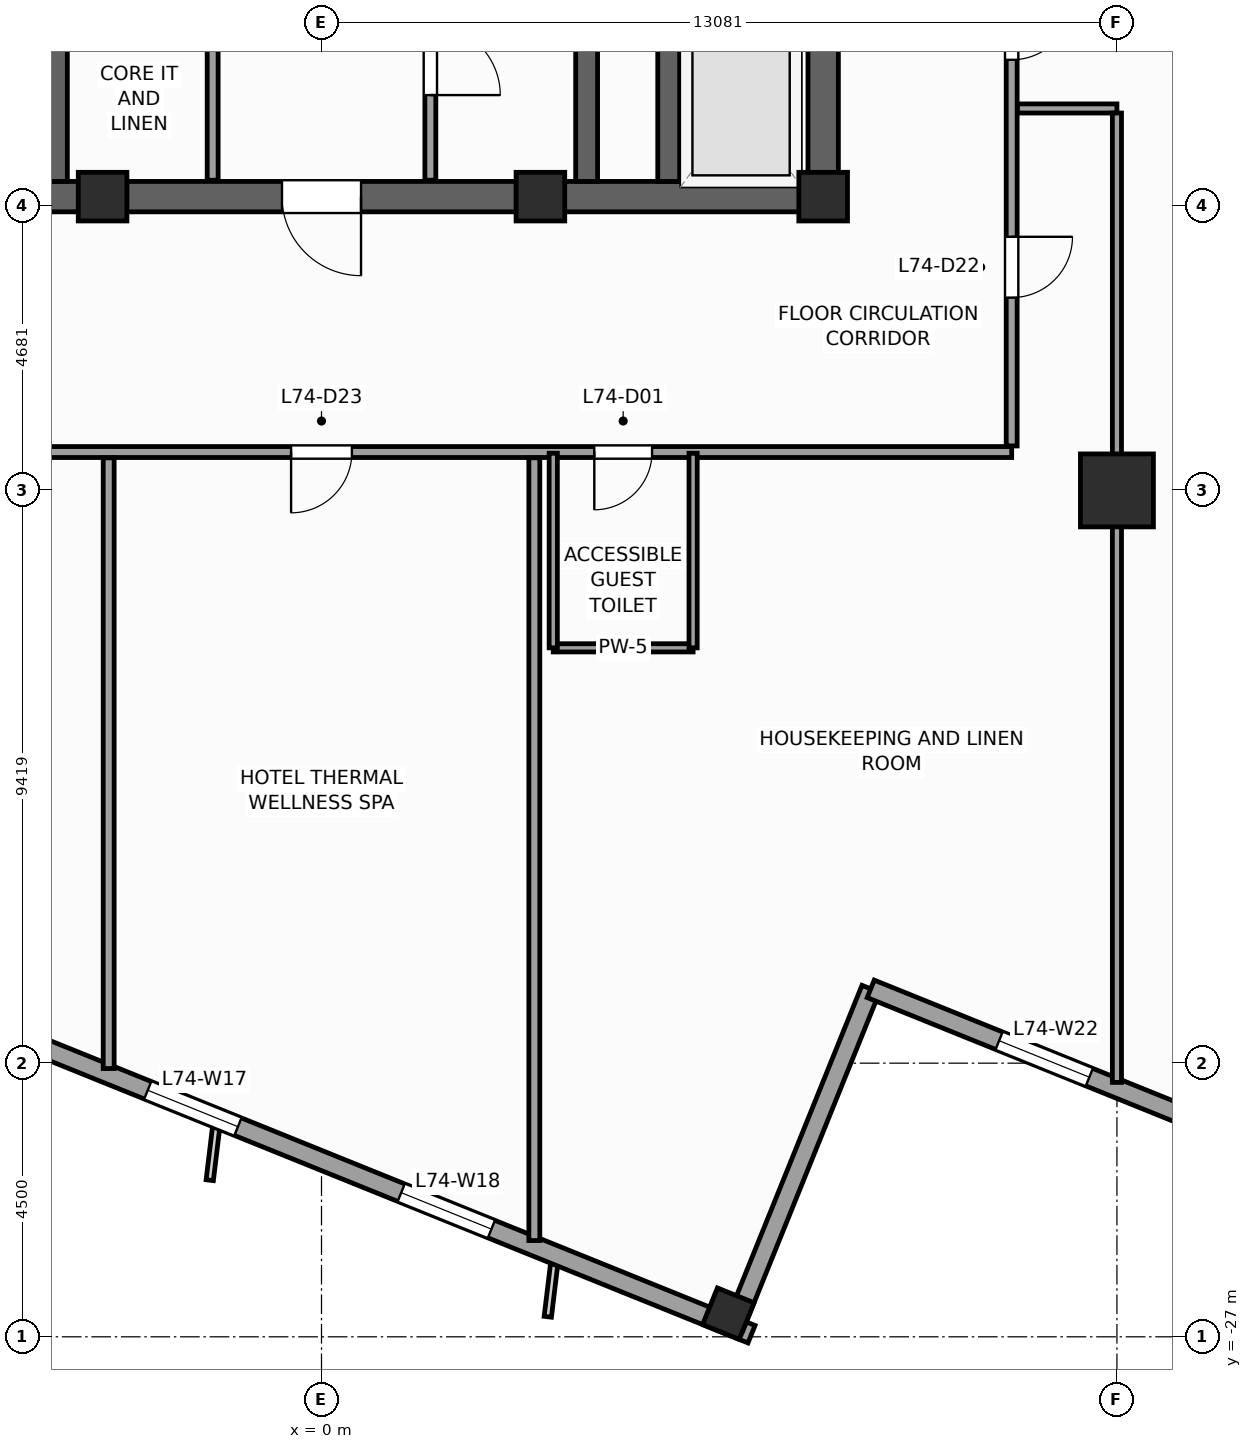
"""IFC4 building model, lengths in metres.
Left out: names, types, materials, properties, quantities, classifications, styles, units other than length and angle.
Written with IfcOpenShell. Run it as: python <this file> out.ifc"""

import sys

from ifc_helpers import new_model, si_unit, direction, frame, frame_2d, origin, origin_2d, place, context, subcontext, project, spatial, rectangle, extrude, source, transform, mapped, element, fill, save


model = new_model("IFC4")
c1 = context("Model", 3, precision=1e-05, world=origin(), true_north=direction((0.0, 1.0)))
c2 = subcontext(c1, "Body", "Model", "MODEL_VIEW")
j1 = project(units=[si_unit("LENGTHUNIT", "METRE"), si_unit("PLANEANGLEUNIT", "RADIAN")], contexts=[c1])
p1 = place(None, origin())
s1 = spatial("IfcSite", under=j1, at=p1, CompositionType="ELEMENT")
p2 = place(p1, origin())
s2 = spatial("IfcBuilding", under=s1, at=p2, CompositionType="ELEMENT")
p3 = place(p2, frame((0.0, 0.0, 301.2)))
s3 = spatial("IfcBuildingStorey", under=s2, at=p3, CompositionType="ELEMENT", Elevation=301.2)
p4 = place(p3, frame((-8.5, -8.25, 0.0), z_axis=(0.0, 0.0, 1.0), x_axis=(1.0, 0.0, 0.0)))
e1 = element("IfcWall", 1, at=p4, inside=s3, PredefinedType="SHEAR", context=c2, shape_type="SweptSolid", body=[
    extrude(rectangle(XDim=17.0, YDim=0.5, at=frame_2d((8.5, 0.0))), origin(), (0.0, 0.0, 1.0), 3.6),
])
p5 = place(p4, frame((7.85, 0.0, 0.0)))
e2 = element("IfcOpeningElement", 2, at=p5, cuts=e1, PredefinedType="OPENING", context=c2, shape_type="SweptSolid", body=[
    extrude(rectangle(XDim=1.3, YDim=2.2, at=frame_2d((0.65, 1.1))), frame((0.0, 0.26, 0.0), z_axis=(0.0, -1.0, 0.0), x_axis=(1.0, 0.0, 0.0)), (0.0, 0.0, 1.0), 0.52),
])
p6 = place(p3, frame((8.25, -8.0, 0.0), z_axis=(0.0, 0.0, 1.0), x_axis=(0.0, 1.0, 0.0)))
e3 = element("IfcWall", 3, at=p6, inside=s3, PredefinedType="SHEAR", context=c2, shape_type="SweptSolid", body=[
    extrude(rectangle(XDim=16.0, YDim=0.5, at=frame_2d((8.0, 0.0))), origin(), (0.0, 0.0, 1.0), 3.6),
])
p7 = place(p6, frame((4.69, 0.0, 0.0)))
e4 = element("IfcOpeningElement", 4, at=p7, cuts=e3, PredefinedType="OPENING", context=c2, shape_type="SweptSolid", body=[
    extrude(rectangle(XDim=1.3, YDim=2.2, at=frame_2d((0.65, 1.1))), frame((0.0, 0.26, 0.0), z_axis=(0.0, -1.0, 0.0), x_axis=(1.0, 0.0, 0.0)), (0.0, 0.0, 1.0), 0.52),
])
for number, where, z_axis, x_axis in (
    (5, (-4.36, -8.0, 0.0), (0.0, 0.0, 1.0), (0.0, 1.0, 0.0)),
    (6, (4.36, -8.0, 0.0), (0.0, 0.0, 1.0), (0.0, 1.0, 0.0)),
):
    element("IfcWall", number, at=place(p3, frame(where, z_axis=z_axis, x_axis=x_axis)), inside=s3, PredefinedType="SHEAR", context=c2, shape_type="SweptSolid", body=[
        extrude(rectangle(XDim=16.0, YDim=0.36, at=frame_2d((8.0, 0.0))), origin(), (0.0, 0.0, 1.0), 3.6),
    ])
p8 = place(p3, frame((5.71, -8.0, 0.0), z_axis=(0.0, 0.0, 1.0), x_axis=(0.0, 1.0, 0.0)))
e7 = element("IfcWall", 7, at=p8, inside=s3, PredefinedType="SHEAR", context=c2, shape_type="SweptSolid", body=[
    extrude(rectangle(XDim=2.54, YDim=0.36, at=frame_2d((1.27, 0.0))), origin(), (0.0, 0.0, 1.0), 3.6),
])
m1 = source(origin(), c2, "Body", "SweptSolid", [
    extrude(rectangle(XDim=0.8, YDim=0.8, at=origin_2d()), origin(), (0.0, 0.0, 1.0), 3.6),
])
for number, where, z_axis, x_axis in (
    (8, (8.25, -8.25, 0.0), (0.0, 0.0, 1.0), (1.0, 0.0, 0.0)),
    (9, (-3.6, -8.25, 0.0), (0.0, 0.0, 1.0), (1.0, 0.0, 0.0)),
    (10, (3.6, -8.25, 0.0), (0.0, 0.0, 1.0), (1.0, 0.0, 0.0)),
):
    element("IfcColumn", number, at=place(p3, frame(where, z_axis=z_axis, x_axis=x_axis)), inside=s3, PredefinedType="PILASTER", context=c2, shape_type="MappedRepresentation", body=[
        mapped(m1, transform((0.0, 0.0, 0.0), scale=1.0)),
    ])
m2 = source(origin(), c2, "Body", "SweptSolid", [
    extrude(rectangle(XDim=1.2, YDim=1.2, at=origin_2d()), origin(), (0.0, 0.0, 1.0), 3.6),
])
p9 = place(p3, frame((13.081, -13.081, 0.0), z_axis=(0.0, 0.0, 1.0), x_axis=(1.0, 0.0, 0.0)))
e11 = element("IfcColumn", 11, at=p9, inside=s3, PredefinedType="COLUMN", context=c2, shape_type="MappedRepresentation", body=[
    mapped(m2, transform((0.0, 0.0, 0.0), scale=1.0)),
])
m3 = source(origin(), c2, "Body", "SweptSolid", [
    extrude(rectangle(XDim=0.65, YDim=0.65, at=origin_2d()), origin(), (0.0, 0.0, 1.0), 3.6),
])
p10 = place(p3, frame((6.69, -26.62, 0.0), z_axis=(0.0, 0.0, 1.0), x_axis=(0.374606593416, 0.927183854567, 0.0)))
e12 = element("IfcColumn", 12, at=p10, inside=s3, PredefinedType="COLUMN", context=c2, shape_type="MappedRepresentation", body=[
    mapped(m3, transform((0.0, 0.0, 0.0), scale=1.0)),
])
p11 = place(p3, frame((-23.813, -14.479, 0.0), z_axis=(0.0, 0.0, 1.0), x_axis=(0.927182657188, -0.374609557019, 0.0)))
e13 = element("IfcWall", 13, at=p11, inside=s3, PredefinedType="STANDARD", context=c2, shape_type="SweptSolid", body=[
    extrude(rectangle(XDim=33.31, YDim=0.31, at=frame_2d((16.655, 0.0))), origin(), (0.0, 0.0, 1.0), 2.75),
])
p12 = place(p11, frame((3.197, 0.0, 0.47)))
e14 = element("IfcOpeningElement", 14, at=p12, cuts=e13, PredefinedType="OPENING", context=c2, shape_type="SweptSolid", body=[
    extrude(rectangle(XDim=1.6, YDim=2.1, at=frame_2d((0.8, 1.05))), frame((0.0, 0.165, 0.0), z_axis=(0.0, -1.0, 0.0), x_axis=(1.0, 0.0, 0.0)), (0.0, 0.0, 1.0), 0.33),
])
p13 = place(p11, frame((8.86, 0.0, 0.47)))
e15 = element("IfcOpeningElement", 15, at=p13, cuts=e13, PredefinedType="OPENING", context=c2, shape_type="SweptSolid", body=[
    extrude(rectangle(XDim=1.6, YDim=2.1, at=frame_2d((0.8, 1.05))), frame((0.0, 0.165, 0.0), z_axis=(0.0, -1.0, 0.0), x_axis=(1.0, 0.0, 0.0)), (0.0, 0.0, 1.0), 0.33),
])
p14 = place(p11, frame((14.439, 0.0, 0.47)))
e16 = element("IfcOpeningElement", 16, at=p14, cuts=e13, PredefinedType="OPENING", context=c2, shape_type="SweptSolid", body=[
    extrude(rectangle(XDim=1.6, YDim=2.1, at=frame_2d((0.8, 1.05))), frame((0.0, 0.165, 0.0), z_axis=(0.0, -1.0, 0.0), x_axis=(1.0, 0.0, 0.0)), (0.0, 0.0, 1.0), 0.33),
])
p15 = place(p11, frame((22.601, 0.0, 0.47)))
e17 = element("IfcOpeningElement", 17, at=p15, cuts=e13, PredefinedType="OPENING", context=c2, shape_type="SweptSolid", body=[
    extrude(rectangle(XDim=1.6, YDim=2.1, at=frame_2d((0.8, 1.05))), frame((0.0, 0.165, 0.0), z_axis=(0.0, -1.0, 0.0), x_axis=(1.0, 0.0, 0.0)), (0.0, 0.0, 1.0), 0.33),
])
p16 = place(p11, frame((27.097, 0.0, 0.47)))
e18 = element("IfcOpeningElement", 18, at=p16, cuts=e13, PredefinedType="OPENING", context=c2, shape_type="SweptSolid", body=[
    extrude(rectangle(XDim=1.6, YDim=2.1, at=frame_2d((0.8, 1.05))), frame((0.0, 0.165, 0.0), z_axis=(0.0, -1.0, 0.0), x_axis=(1.0, 0.0, 0.0)), (0.0, 0.0, 1.0), 0.33),
])
p17 = place(p3, frame((6.784, -26.841, 0.0), z_axis=(0.0, 0.0, 1.0), x_axis=(0.374636620962, 0.927171722085, 0.0)))
e19 = element("IfcWall", 19, at=p17, inside=s3, PredefinedType="STANDARD", context=c2, shape_type="SweptSolid", body=[
    extrude(rectangle(XDim=6.0, YDim=0.31, at=frame_2d((3.0, 0.0))), origin(), (0.0, 0.0, 1.0), 2.65),
])
p18 = place(p3, frame((9.032, -21.278, 0.0), z_axis=(0.0, 0.0, 1.0), x_axis=(0.927185411764, -0.374602739196, 0.0)))
e20 = element("IfcWall", 20, at=p18, inside=s3, PredefinedType="STANDARD", context=c2, shape_type="SweptSolid", body=[
    extrude(rectangle(XDim=6.155, YDim=0.31, at=frame_2d((3.078, 0.0))), origin(), (0.0, 0.0, 1.0), 3.35),
])
p19 = place(p18, frame((2.278, 0.0, 0.47)))
e21 = element("IfcOpeningElement", 21, at=p19, cuts=e20, PredefinedType="OPENING", context=c2, shape_type="SweptSolid", body=[
    extrude(rectangle(XDim=1.6, YDim=2.1, at=frame_2d((0.8, 1.05))), frame((0.0, 0.165, 0.0), z_axis=(0.0, -1.0, 0.0), x_axis=(1.0, 0.0, 0.0)), (0.0, 0.0, 1.0), 0.33),
])
p20 = place(p3, frame((-1.79, -7.98, 0.0), z_axis=(0.0, 0.0, 1.0), x_axis=(0.0, 1.0, 0.0)))
e22 = element("IfcWall", 22, at=p20, inside=s3, PredefinedType="PARTITIONING", context=c2, shape_type="SweptSolid", body=[
    extrude(rectangle(XDim=12.38, YDim=0.18, at=frame_2d((6.19, 0.0))), origin(), (0.0, 0.0, 1.0), 3.35),
])
p21 = place(p20, frame((8.8, 0.0, 0.0)))
e23 = element("IfcOpeningElement", 23, at=p21, cuts=e22, PredefinedType="OPENING", context=c2, shape_type="SweptSolid", body=[
    extrude(rectangle(XDim=1.1, YDim=2.2, at=frame_2d((0.55, 1.1))), frame((0.0, 0.1, 0.0), z_axis=(0.0, -1.0, 0.0), x_axis=(1.0, 0.0, 0.0)), (0.0, 0.0, 1.0), 0.2),
])
p22 = place(p20, frame((10.86, 0.0, 0.0)))
e24 = element("IfcOpeningElement", 24, at=p22, cuts=e22, PredefinedType="OPENING", context=c2, shape_type="SweptSolid", body=[
    extrude(rectangle(XDim=1.1, YDim=2.2, at=frame_2d((0.55, 1.1))), frame((0.0, 0.1, 0.0), z_axis=(0.0, -1.0, 0.0), x_axis=(1.0, 0.0, 0.0)), (0.0, 0.0, 1.0), 0.2),
])
p23 = place(p20, frame((3.5, 0.0, 0.0)))
e25 = element("IfcOpeningElement", 25, at=p23, cuts=e22, PredefinedType="OPENING", context=c2, shape_type="SweptSolid", body=[
    extrude(rectangle(XDim=1.15, YDim=2.25, at=frame_2d((0.575, 1.125))), frame((0.0, 0.1, 0.0), z_axis=(0.0, -1.0, 0.0), x_axis=(1.0, 0.0, 0.0)), (0.0, 0.0, 1.0), 0.2),
])
p24 = place(p3, frame((1.79, -7.98, 0.0), z_axis=(0.0, 0.0, 1.0), x_axis=(0.0, 1.0, 0.0)))
e26 = element("IfcWall", 26, at=p24, inside=s3, PredefinedType="PARTITIONING", context=c2, shape_type="SweptSolid", body=[
    extrude(rectangle(XDim=12.38, YDim=0.18, at=frame_2d((6.19, 0.0))), origin(), (0.0, 0.0, 1.0), 3.35),
])
p25 = place(p24, frame((8.8, 0.0, 0.0)))
e27 = element("IfcOpeningElement", 27, at=p25, cuts=e26, PredefinedType="OPENING", context=c2, shape_type="SweptSolid", body=[
    extrude(rectangle(XDim=1.1, YDim=2.2, at=frame_2d((0.55, 1.1))), frame((0.0, 0.1, 0.0), z_axis=(0.0, -1.0, 0.0), x_axis=(1.0, 0.0, 0.0)), (0.0, 0.0, 1.0), 0.2),
])
p26 = place(p24, frame((10.86, 0.0, 0.0)))
e28 = element("IfcOpeningElement", 28, at=p26, cuts=e26, PredefinedType="OPENING", context=c2, shape_type="SweptSolid", body=[
    extrude(rectangle(XDim=1.1, YDim=2.2, at=frame_2d((0.55, 1.1))), frame((0.0, 0.1, 0.0), z_axis=(0.0, -1.0, 0.0), x_axis=(1.0, 0.0, 0.0)), (0.0, 0.0, 1.0), 0.2),
])
p27 = place(p24, frame((1.4, 0.0, 0.0)))
e29 = element("IfcOpeningElement", 29, at=p27, cuts=e26, PredefinedType="OPENING", context=c2, shape_type="SweptSolid", body=[
    extrude(rectangle(XDim=1.15, YDim=2.25, at=frame_2d((0.575, 1.125))), frame((0.0, 0.1, 0.0), z_axis=(0.0, -1.0, 0.0), x_axis=(1.0, 0.0, 0.0)), (0.0, 0.0, 1.0), 0.2),
])
p28 = place(p24, frame((5.6, 0.0, 0.0)))
e30 = element("IfcOpeningElement", 30, at=p28, cuts=e26, PredefinedType="OPENING", context=c2, shape_type="SweptSolid", body=[
    extrude(rectangle(XDim=1.15, YDim=2.25, at=frame_2d((0.575, 1.125))), frame((0.0, 0.1, 0.0), z_axis=(0.0, -1.0, 0.0), x_axis=(1.0, 0.0, 0.0)), (0.0, 0.0, 1.0), 0.2),
])
p29 = place(p3, frame((-10.3, -12.45, 0.0), z_axis=(0.0, 0.0, 1.0), x_axis=(1.0, 0.0, 0.0)))
e31 = element("IfcWall", 31, at=p29, inside=s3, PredefinedType="PARTITIONING", context=c2, shape_type="SweptSolid", body=[
    extrude(rectangle(XDim=21.65, YDim=0.18, at=frame_2d((10.825, 0.0))), origin(), (0.0, 0.0, 1.0), 3.35),
])
p30 = place(p29, frame((14.786, 0.0, 0.0)))
e32 = element("IfcOpeningElement", 32, at=p30, cuts=e31, PredefinedType="OPENING", context=c2, shape_type="SweptSolid", body=[
    extrude(rectangle(XDim=0.95, YDim=2.1, at=frame_2d((0.475, 1.05))), frame((0.0, 0.1, 0.0), z_axis=(0.0, -1.0, 0.0), x_axis=(1.0, 0.0, 0.0)), (0.0, 0.0, 1.0), 0.2),
])
p31 = place(p29, frame((9.8, 0.0, 0.0)))
e33 = element("IfcOpeningElement", 33, at=p31, cuts=e31, PredefinedType="OPENING", context=c2, shape_type="SweptSolid", body=[
    extrude(rectangle(XDim=1.0, YDim=2.15, at=frame_2d((0.5, 1.075))), frame((0.0, 0.1, 0.0), z_axis=(0.0, -1.0, 0.0), x_axis=(1.0, 0.0, 0.0)), (0.0, 0.0, 1.0), 0.2),
])
p32 = place(p29, frame((3.064, 0.0, 0.0)))
e34 = element("IfcOpeningElement", 34, at=p32, cuts=e31, PredefinedType="OPENING", context=c2, shape_type="SweptSolid", body=[
    extrude(rectangle(XDim=1.0, YDim=2.15, at=frame_2d((0.5, 1.075))), frame((0.0, 0.1, 0.0), z_axis=(0.0, -1.0, 0.0), x_axis=(1.0, 0.0, 0.0)), (0.0, 0.0, 1.0), 0.2),
])
p33 = place(p3, frame((11.35, -12.35, 0.0), z_axis=(0.0, 0.0, 1.0), x_axis=(0.0, 1.0, 0.0)))
e35 = element("IfcWall", 35, at=p33, inside=s3, PredefinedType="PARTITIONING", context=c2, shape_type="SweptSolid", body=[
    extrude(rectangle(XDim=22.55, YDim=0.18, at=frame_2d((11.275, 0.0))), origin(), (0.0, 0.0, 1.0), 3.35),
])
p34 = place(p33, frame((17.15, 0.0, 0.0)))
e36 = element("IfcOpeningElement", 36, at=p34, cuts=e35, PredefinedType="OPENING", context=c2, shape_type="SweptSolid", body=[
    extrude(rectangle(XDim=1.0, YDim=2.15, at=frame_2d((0.5, 1.075))), frame((0.0, 0.1, 0.0), z_axis=(0.0, -1.0, 0.0), x_axis=(1.0, 0.0, 0.0)), (0.0, 0.0, 1.0), 0.2),
])
p35 = place(p33, frame((13.5, 0.0, 0.0)))
e37 = element("IfcOpeningElement", 37, at=p35, cuts=e35, PredefinedType="OPENING", context=c2, shape_type="SweptSolid", body=[
    extrude(rectangle(XDim=1.0, YDim=2.15, at=frame_2d((0.5, 1.075))), frame((0.0, 0.1, 0.0), z_axis=(0.0, -1.0, 0.0), x_axis=(1.0, 0.0, 0.0)), (0.0, 0.0, 1.0), 0.2),
])
p36 = place(p33, frame((9.5, 0.0, 0.0)))
e38 = element("IfcOpeningElement", 38, at=p36, cuts=e35, PredefinedType="OPENING", context=c2, shape_type="SweptSolid", body=[
    extrude(rectangle(XDim=1.0, YDim=2.15, at=frame_2d((0.5, 1.075))), frame((0.0, 0.1, 0.0), z_axis=(0.0, -1.0, 0.0), x_axis=(1.0, 0.0, 0.0)), (0.0, 0.0, 1.0), 0.2),
])
p37 = place(p33, frame((6.35, 0.0, 0.0)))
e39 = element("IfcOpeningElement", 39, at=p37, cuts=e35, PredefinedType="OPENING", context=c2, shape_type="SweptSolid", body=[
    extrude(rectangle(XDim=1.0, YDim=2.15, at=frame_2d((0.5, 1.075))), frame((0.0, 0.1, 0.0), z_axis=(0.0, -1.0, 0.0), x_axis=(1.0, 0.0, 0.0)), (0.0, 0.0, 1.0), 0.2),
])
p38 = place(p33, frame((2.439, 0.0, 0.0)))
e40 = element("IfcOpeningElement", 40, at=p38, cuts=e35, PredefinedType="OPENING", context=c2, shape_type="SweptSolid", body=[
    extrude(rectangle(XDim=1.0, YDim=2.15, at=frame_2d((0.5, 1.075))), frame((0.0, 0.1, 0.0), z_axis=(0.0, -1.0, 0.0), x_axis=(1.0, 0.0, 0.0)), (0.0, 0.0, 1.0), 0.2),
])
p39 = place(p3, frame((3.5, -12.545, 0.0), z_axis=(0.0, 0.0, 1.0), x_axis=(0.0, -1.0, 0.0)))
e41 = element("IfcWall", 41, at=p39, inside=s3, PredefinedType="PARTITIONING", context=c2, shape_type="SweptSolid", body=[
    extrude(rectangle(XDim=12.872, YDim=0.18, at=frame_2d((6.436, 0.0))), origin(), (0.0, 0.0, 1.0), 3.35),
])
p40 = place(p3, frame((-3.5, -12.545, 0.0), z_axis=(0.0, 0.0, 1.0), x_axis=(0.0, -1.0, 0.0)))
e42 = element("IfcWall", 42, at=p40, inside=s3, PredefinedType="PARTITIONING", context=c2, shape_type="SweptSolid", body=[
    extrude(rectangle(XDim=10.044, YDim=0.18, at=frame_2d((5.022, 0.0))), origin(), (0.0, 0.0, 1.0), 3.35),
])
p41 = place(p3, frame((11.445, -6.8, 0.0), z_axis=(0.0, 0.0, 1.0), x_axis=(1.0, 0.0, 0.0)))
e43 = element("IfcWall", 43, at=p41, inside=s3, PredefinedType="PARTITIONING", context=c2, shape_type="SweptSolid", body=[
    extrude(rectangle(XDim=1.636, YDim=0.15, at=frame_2d((0.818, 0.0))), origin(), (0.0, 0.0, 1.0), 3.35),
])
p42 = place(p3, frame((13.081, -6.875, 0.0), z_axis=(0.0, 0.0, 1.0), x_axis=(0.0, -1.0, 0.0)))
e44 = element("IfcWall", 44, at=p42, inside=s3, PredefinedType="PARTITIONING", context=c2, shape_type="SweptSolid", body=[
    extrude(rectangle(XDim=15.942, YDim=0.15, at=frame_2d((7.971, 0.0))), origin(), (0.0, 0.0, 1.0), 2.45),
])
p43 = place(p3, frame((3.811, -15.67, 0.0), z_axis=(0.0, 0.0, 1.0), x_axis=(1.0, 0.0, 0.0)))
e45 = element("IfcWall", 45, at=p43, inside=s3, PredefinedType="PARTITIONING", context=c2, shape_type="SweptSolid", body=[
    extrude(rectangle(XDim=2.3, YDim=0.135, at=frame_2d((1.15, 0.0))), origin(), (0.0, 0.0, 1.0), 3.35),
])
for number, where, z_axis, x_axis in (
    (46, (6.111, -15.67, 0.0), (0.0, 0.0, 1.0), (0.0, 1.0, 0.0)),
    (47, (3.811, -15.67, 0.0), (0.0, 0.0, 1.0), (0.0, 1.0, 0.0)),
):
    element("IfcWall", number, at=place(p3, frame(where, z_axis=z_axis, x_axis=x_axis)), inside=s3, PredefinedType="PARTITIONING", context=c2, shape_type="SweptSolid", body=[
        extrude(rectangle(XDim=3.2, YDim=0.135, at=frame_2d((1.6, 0.0))), origin(), (0.0, 0.0, 1.0), 3.35),
    ])
m4 = source(origin(), c2, "Body", "SweptSolid", [
    extrude(rectangle(XDim=1.6, YDim=2.1, at=frame_2d((0.8, 1.05))), frame((0.0, 0.03, 0.0), z_axis=(0.0, -1.0, 0.0), x_axis=(1.0, 0.0, 0.0)), (0.0, 0.0, 1.0), 0.06),
])
p44 = place(p15, origin())
e48 = element("IfcWindow", 48, at=p44, inside=s3, PartitioningType="SINGLE_PANEL", PredefinedType="WINDOW", context=c2, shape_type="MappedRepresentation", body=[
    mapped(m4, transform((0.0, 0.0, 0.0), scale=1.0)),
])
fill(e17, e48)
p45 = place(p16, origin())
e49 = element("IfcWindow", 49, at=p45, inside=s3, PartitioningType="SINGLE_PANEL", PredefinedType="WINDOW", context=c2, shape_type="MappedRepresentation", body=[
    mapped(m4, transform((0.0, 0.0, 0.0), scale=1.0)),
])
fill(e18, e49)
p46 = place(p19, origin())
e50 = element("IfcWindow", 50, at=p46, inside=s3, PartitioningType="SINGLE_PANEL", PredefinedType="WINDOW", context=c2, shape_type="MappedRepresentation", body=[
    mapped(m4, transform((0.0, 0.0, 0.0), scale=1.0)),
])
fill(e21, e50)
m5 = source(origin(), c2, "Body", "SweptSolid", [
    extrude(rectangle(XDim=1.3, YDim=2.2, at=frame_2d((0.65, 1.1))), frame((0.0, 0.025, 0.0), z_axis=(0.0, -1.0, 0.0), x_axis=(1.0, 0.0, 0.0)), (0.0, 0.0, 1.0), 0.05),
])
p47 = place(p5, frame((1.3, 0.0, 0.0), z_axis=(0.0, 0.0, 1.0), x_axis=(-1.0, 0.0, 0.0)))
e51 = element("IfcDoor", 51, at=p47, inside=s3, OperationType="SINGLE_SWING_RIGHT", PredefinedType="DOOR", context=c2, shape_type="MappedRepresentation", body=[
    mapped(m5, transform((0.0, 0.0, 0.0), scale=1.0)),
])
fill(e2, e51)
m6 = source(origin(), c2, "Body", "SweptSolid", [
    extrude(rectangle(XDim=1.15, YDim=2.25, at=frame_2d((0.575, 1.125))), frame((0.0, 0.025, 0.0), z_axis=(0.0, -1.0, 0.0), x_axis=(1.0, 0.0, 0.0)), (0.0, 0.0, 1.0), 0.05),
])
p48 = place(p27, frame((1.15, 0.0, 0.0), z_axis=(0.0, 0.0, 1.0), x_axis=(-1.0, 0.0, 0.0)))
e52 = element("IfcDoor", 52, at=p48, inside=s3, OperationType="SINGLE_SWING_LEFT", PredefinedType="DOOR", context=c2, shape_type="MappedRepresentation", body=[
    mapped(m6, transform((0.0, 0.0, 0.0), scale=1.0)),
])
fill(e29, e52)
m7 = source(origin(), c2, "Body", "SweptSolid", [
    extrude(rectangle(XDim=0.95, YDim=2.1, at=frame_2d((0.475, 1.05))), frame((0.0, 0.025, 0.0), z_axis=(0.0, -1.0, 0.0), x_axis=(1.0, 0.0, 0.0)), (0.0, 0.0, 1.0), 0.05),
])
p49 = place(p30, frame((0.95, 0.0, 0.0), z_axis=(0.0, 0.0, 1.0), x_axis=(-1.0, 0.0, 0.0)))
e53 = element("IfcDoor", 53, at=p49, inside=s3, OperationType="SINGLE_SWING_LEFT", PredefinedType="DOOR", context=c2, shape_type="MappedRepresentation", body=[
    mapped(m7, transform((0.0, 0.0, 0.0), scale=1.0)),
])
fill(e32, e53)
m8 = source(origin(), c2, "Body", "SweptSolid", [
    extrude(rectangle(XDim=1.0, YDim=2.15, at=frame_2d((0.5, 1.075))), frame((0.0, 0.025, 0.0), z_axis=(0.0, -1.0, 0.0), x_axis=(1.0, 0.0, 0.0)), (0.0, 0.0, 1.0), 0.05),
])
p50 = place(p37, frame((1.0, 0.0, 0.0), z_axis=(0.0, 0.0, 1.0), x_axis=(-1.0, 0.0, 0.0)))
e54 = element("IfcDoor", 54, at=p50, inside=s3, OperationType="SINGLE_SWING_RIGHT", PredefinedType="DOOR", context=c2, shape_type="MappedRepresentation", body=[
    mapped(m8, transform((0.0, 0.0, 0.0), scale=1.0)),
])
fill(e39, e54)
p51 = place(p38, frame((1.0, 0.0, 0.0), z_axis=(0.0, 0.0, 1.0), x_axis=(-1.0, 0.0, 0.0)))
e55 = element("IfcDoor", 55, at=p51, inside=s3, OperationType="SINGLE_SWING_RIGHT", PredefinedType="DOOR", context=c2, shape_type="MappedRepresentation", body=[
    mapped(m8, transform((0.0, 0.0, 0.0), scale=1.0)),
])
fill(e40, e55)
p52 = place(p31, frame((1.0, 0.0, 0.0), z_axis=(0.0, 0.0, 1.0), x_axis=(-1.0, 0.0, 0.0)))
e56 = element("IfcDoor", 56, at=p52, inside=s3, OperationType="SINGLE_SWING_LEFT", PredefinedType="DOOR", context=c2, shape_type="MappedRepresentation", body=[
    mapped(m8, transform((0.0, 0.0, 0.0), scale=1.0)),
])
fill(e33, e56)
save(model, sys.argv[1])
